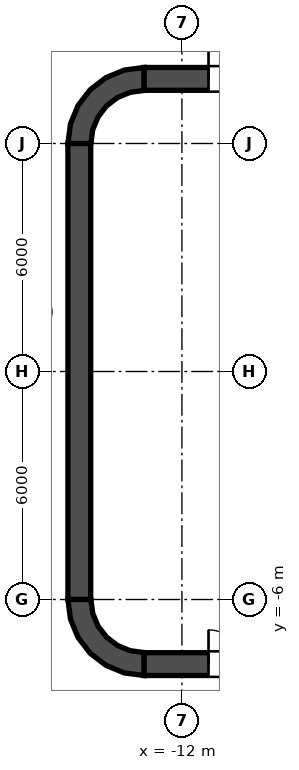
"""IFC4 building model, lengths in metres.
Left out: names, types, materials, properties, quantities, classifications, styles, units other than length and angle.
Written with IfcOpenShell. Run it as: python <this file> out.ifc"""

import sys

from ifc_helpers import new_model, si_unit, direction, frame, frame_2d, origin, place, context, subcontext, project, spatial, polyline, rectangle, outline, extrude, element, fill, save


model = new_model("IFC4")
c1 = context("Model", 3, precision=1e-05, world=origin(), true_north=direction((0.0, 1.0)))
c2 = subcontext(c1, "Body", "Model", "MODEL_VIEW")
j1 = project(units=[si_unit("LENGTHUNIT", "METRE"), si_unit("PLANEANGLEUNIT", "RADIAN")], contexts=[c1])
p1 = place(None, origin())
s1 = spatial("IfcSite", under=j1, at=p1, CompositionType="ELEMENT")
p2 = place(p1, origin())
s2 = spatial("IfcBuilding", under=s1, at=p2, CompositionType="ELEMENT")
p3 = place(p2, frame((0.0, 0.0, 8.0)))
s3 = spatial("IfcBuildingStorey", under=s2, at=p3, CompositionType="ELEMENT", Elevation=8.0)
p4 = place(p3, frame((-13.0, 7.7, 0.0), z_axis=(0.0, 0.0, 1.0), x_axis=(1.0, 0.0, 0.0)))
e1 = element("IfcWall", 1, at=p4, inside=s3, PredefinedType="SHEAR", context=c2, shape_type="SweptSolid", body=[
    extrude(rectangle(XDim=26.0, YDim=0.6, at=frame_2d((13.0, 0.0))), origin(), (0.0, 0.0, 1.0), 9.0),
])
p5 = place(p4, frame((1.7, 0.0, 0.0)))
e2 = element("IfcOpeningElement", 2, at=p5, cuts=e1, PredefinedType="OPENING", context=c2, shape_type="SweptSolid", body=[
    extrude(rectangle(XDim=1.8, YDim=2.1, at=frame_2d((0.9, 1.05))), frame((0.0, 0.3, 0.0), z_axis=(0.0, -1.0, 0.0), x_axis=(1.0, 0.0, 0.0)), (0.0, 0.0, 1.0), 0.6),
])
p6 = place(p4, frame((22.5, 0.0, 0.0)))
e3 = element("IfcOpeningElement", 3, at=p6, cuts=e1, PredefinedType="OPENING", context=c2, shape_type="SweptSolid", body=[
    extrude(rectangle(XDim=1.8, YDim=2.1, at=frame_2d((0.9, 1.05))), frame((0.0, 0.3, 0.0), z_axis=(0.0, -1.0, 0.0), x_axis=(1.0, 0.0, 0.0)), (0.0, 0.0, 1.0), 0.6),
])
p7 = place(p3, frame((-13.0, -7.7, 0.0), z_axis=(0.0, 0.0, 1.0), x_axis=(1.0, 0.0, 0.0)))
e4 = element("IfcWall", 4, at=p7, inside=s3, PredefinedType="SHEAR", context=c2, shape_type="SweptSolid", body=[
    extrude(rectangle(XDim=26.0, YDim=0.6, at=frame_2d((13.0, 0.0))), origin(), (0.0, 0.0, 1.0), 9.0),
])
p8 = place(p7, frame((1.7, 0.0, 0.0)))
e5 = element("IfcOpeningElement", 5, at=p8, cuts=e4, PredefinedType="OPENING", context=c2, shape_type="SweptSolid", body=[
    extrude(rectangle(XDim=1.8, YDim=2.1, at=frame_2d((0.9, 1.05))), frame((0.0, 0.3, 0.0), z_axis=(0.0, -1.0, 0.0), x_axis=(1.0, 0.0, 0.0)), (0.0, 0.0, 1.0), 0.6),
])
p9 = place(p7, frame((22.5, 0.0, 0.0)))
e6 = element("IfcOpeningElement", 6, at=p9, cuts=e4, PredefinedType="OPENING", context=c2, shape_type="SweptSolid", body=[
    extrude(rectangle(XDim=1.8, YDim=2.1, at=frame_2d((0.9, 1.05))), frame((0.0, 0.3, 0.0), z_axis=(0.0, -1.0, 0.0), x_axis=(1.0, 0.0, 0.0)), (0.0, 0.0, 1.0), 0.6),
])
p10 = place(p3, frame((-14.7, -6.0, 0.0), z_axis=(0.0, 0.0, 1.0), x_axis=(0.0, 1.0, 0.0)))
e7 = element("IfcWall", 7, at=p10, inside=s3, PredefinedType="SHEAR", context=c2, shape_type="SweptSolid", body=[
    extrude(rectangle(XDim=12.0, YDim=0.6, at=frame_2d((6.0, 0.0))), origin(), (0.0, 0.0, 1.0), 9.0),
])
p11 = place(p3, origin())
e8 = element("IfcWall", 8, at=p11, inside=s3, PredefinedType="SHEAR", context=c2, shape_type="SweptSolid", body=[
    extrude(outline(polyline([(-15.0, 6.0), (-14.395, 6.0), (-14.347, 6.361), (-14.208, 6.698), (-13.986, 6.986), (-13.698, 7.208), (-13.361, 7.347), (-13.0, 7.395), (-13.0, 8.0), (-13.518, 7.932), (-14.0, 7.732), (-14.414, 7.414), (-14.732, 7.0), (-14.932, 6.518), (-15.0, 6.0)])), origin(), (0.0, 0.0, 1.0), 9.0),
])
e9 = element("IfcWall", 9, at=p11, inside=s3, PredefinedType="SHEAR", context=c2, shape_type="SweptSolid", body=[
    extrude(outline(polyline([(-13.0, -8.0), (-13.0, -7.395), (-13.361, -7.347), (-13.698, -7.208), (-13.986, -6.986), (-14.208, -6.698), (-14.347, -6.361), (-14.395, -6.0), (-15.0, -6.0), (-14.932, -6.518), (-14.732, -7.0), (-14.414, -7.414), (-14.0, -7.732), (-13.518, -7.932), (-13.0, -8.0)])), origin(), (0.0, 0.0, 1.0), 9.0),
])
p12 = place(p3, frame((-11.8, -7.4, 0.0), z_axis=(0.0, 0.0, 1.0), x_axis=(0.0, 1.0, 0.0)))
e10 = element("IfcWall", 10, at=p12, inside=s3, PredefinedType="SOLIDWALL", context=c2, shape_type="SweptSolid", body=[
    extrude(rectangle(XDim=14.8, YDim=0.4, at=frame_2d((7.4, 0.0))), origin(), (0.0, 0.0, 1.0), 8.8),
])
p13 = place(p12, frame((11.2, 0.0, 0.0)))
e11 = element("IfcOpeningElement", 11, at=p13, cuts=e10, PredefinedType="OPENING", context=c2, shape_type="SweptSolid", body=[
    extrude(rectangle(XDim=1.1, YDim=2.1, at=frame_2d((0.55, 1.05))), frame((0.0, 0.2, 0.0), z_axis=(0.0, -1.0, 0.0), x_axis=(1.0, 0.0, 0.0)), (0.0, 0.0, 1.0), 0.4),
])
p14 = place(p12, frame((8.3, 0.0, 0.0)))
e12 = element("IfcOpeningElement", 12, at=p14, cuts=e10, PredefinedType="OPENING", context=c2, shape_type="SweptSolid", body=[
    extrude(rectangle(XDim=1.1, YDim=2.1, at=frame_2d((0.55, 1.05))), frame((0.0, 0.2, 0.0), z_axis=(0.0, -1.0, 0.0), x_axis=(1.0, 0.0, 0.0)), (0.0, 0.0, 1.0), 0.4),
])
p15 = place(p12, frame((5.4, 0.0, 0.0)))
e13 = element("IfcOpeningElement", 13, at=p15, cuts=e10, PredefinedType="OPENING", context=c2, shape_type="SweptSolid", body=[
    extrude(rectangle(XDim=1.1, YDim=2.1, at=frame_2d((0.55, 1.05))), frame((0.0, 0.2, 0.0), z_axis=(0.0, -1.0, 0.0), x_axis=(1.0, 0.0, 0.0)), (0.0, 0.0, 1.0), 0.4),
])
p16 = place(p12, frame((13.552, 0.0, 0.0)))
e14 = element("IfcOpeningElement", 14, at=p16, cuts=e10, PredefinedType="OPENING", context=c2, shape_type="SweptSolid", body=[
    extrude(rectangle(XDim=0.9, YDim=2.1, at=frame_2d((0.45, 1.05))), frame((0.0, 0.2, 0.0), z_axis=(0.0, -1.0, 0.0), x_axis=(1.0, 0.0, 0.0)), (0.0, 0.0, 1.0), 0.4),
])
p17 = place(p12, frame((0.347, 0.0, 0.0)))
e15 = element("IfcOpeningElement", 15, at=p17, cuts=e10, PredefinedType="OPENING", context=c2, shape_type="SweptSolid", body=[
    extrude(rectangle(XDim=0.9, YDim=2.1, at=frame_2d((0.45, 1.05))), frame((0.0, 0.2, 0.0), z_axis=(0.0, -1.0, 0.0), x_axis=(1.0, 0.0, 0.0)), (0.0, 0.0, 1.0), 0.4),
])
e16 = element("IfcWall", 16, at=p11, inside=s3, PredefinedType="SOLIDWALL", context=c2, shape_type="SweptSolid", body=[
    extrude(outline(polyline([(-12.0, -5.925), (-12.0, -5.675), (-14.15, -5.675), (-14.15, -3.025), (-12.0, -3.025), (-12.0, -2.775), (-14.15, -2.775), (-14.15, -0.125), (-12.0, -0.125), (-12.0, 0.125), (-14.15, 0.125), (-14.15, 2.775), (-12.0, 2.775), (-12.0, 3.025), (-14.15, 3.025), (-14.15, 5.675), (-12.0, 5.675), (-12.0, 5.925), (-14.15, 5.925), (-14.4, 5.925), (-14.4, 5.675), (-14.4, 3.025), (-14.4, 2.775), (-14.4, 0.125), (-14.4, -0.125), (-14.4, -2.775), (-14.4, -3.025), (-14.4, -5.675), (-14.4, -5.925), (-14.15, -5.925), (-12.0, -5.925)])), origin(), (0.0, 0.0, 1.0), 8.8),
])
p18 = place(p13, origin())
e17 = element("IfcDoor", 17, at=p18, inside=s3, OperationType="DOUBLE_DOOR_SLIDING", PredefinedType="DOOR", context=c2, shape_type="SweptSolid", body=[
    extrude(rectangle(XDim=1.1, YDim=2.1, at=frame_2d((0.55, 1.05))), frame((0.0, 0.025, 0.0), z_axis=(0.0, -1.0, 0.0), x_axis=(1.0, 0.0, 0.0)), (0.0, 0.0, 1.0), 0.05),
])
fill(e11, e17)
p19 = place(p14, origin())
e18 = element("IfcDoor", 18, at=p19, inside=s3, OperationType="DOUBLE_DOOR_SLIDING", PredefinedType="DOOR", context=c2, shape_type="SweptSolid", body=[
    extrude(rectangle(XDim=1.1, YDim=2.1, at=frame_2d((0.55, 1.05))), frame((0.0, 0.025, 0.0), z_axis=(0.0, -1.0, 0.0), x_axis=(1.0, 0.0, 0.0)), (0.0, 0.0, 1.0), 0.05),
])
fill(e12, e18)
p20 = place(p15, origin())
e19 = element("IfcDoor", 19, at=p20, inside=s3, OperationType="DOUBLE_DOOR_SLIDING", PredefinedType="DOOR", context=c2, shape_type="SweptSolid", body=[
    extrude(rectangle(XDim=1.1, YDim=2.1, at=frame_2d((0.55, 1.05))), frame((0.0, 0.025, 0.0), z_axis=(0.0, -1.0, 0.0), x_axis=(1.0, 0.0, 0.0)), (0.0, 0.0, 1.0), 0.05),
])
fill(e13, e19)
p21 = place(p16, origin())
e20 = element("IfcDoor", 20, at=p21, inside=s3, OperationType="SINGLE_SWING_LEFT", PredefinedType="DOOR", context=c2, shape_type="SweptSolid", body=[
    extrude(rectangle(XDim=0.9, YDim=2.1, at=frame_2d((0.45, 1.05))), frame((0.0, 0.025, 0.0), z_axis=(0.0, -1.0, 0.0), x_axis=(1.0, 0.0, 0.0)), (0.0, 0.0, 1.0), 0.05),
])
fill(e14, e20)
p22 = place(p17, origin())
e21 = element("IfcDoor", 21, at=p22, inside=s3, OperationType="SINGLE_SWING_LEFT", PredefinedType="DOOR", context=c2, shape_type="SweptSolid", body=[
    extrude(rectangle(XDim=0.9, YDim=2.1, at=frame_2d((0.45, 1.05))), frame((0.0, 0.025, 0.0), z_axis=(0.0, -1.0, 0.0), x_axis=(1.0, 0.0, 0.0)), (0.0, 0.0, 1.0), 0.05),
])
fill(e15, e21)
p23 = place(p5, origin())
e22 = element("IfcDoor", 22, at=p23, inside=s3, OperationType="DOUBLE_DOOR_SINGLE_SWING", PredefinedType="DOOR", context=c2, shape_type="SweptSolid", body=[
    extrude(rectangle(XDim=1.8, YDim=2.1, at=frame_2d((0.9, 1.05))), frame((0.0, 0.025, 0.0), z_axis=(0.0, -1.0, 0.0), x_axis=(1.0, 0.0, 0.0)), (0.0, 0.0, 1.0), 0.05),
])
fill(e2, e22)
p24 = place(p8, origin())
e23 = element("IfcDoor", 23, at=p24, inside=s3, OperationType="DOUBLE_DOOR_SINGLE_SWING", PredefinedType="DOOR", context=c2, shape_type="SweptSolid", body=[
    extrude(rectangle(XDim=1.8, YDim=2.1, at=frame_2d((0.9, 1.05))), frame((0.0, 0.025, 0.0), z_axis=(0.0, -1.0, 0.0), x_axis=(1.0, 0.0, 0.0)), (0.0, 0.0, 1.0), 0.05),
])
fill(e5, e23)
save(model, sys.argv[1])
